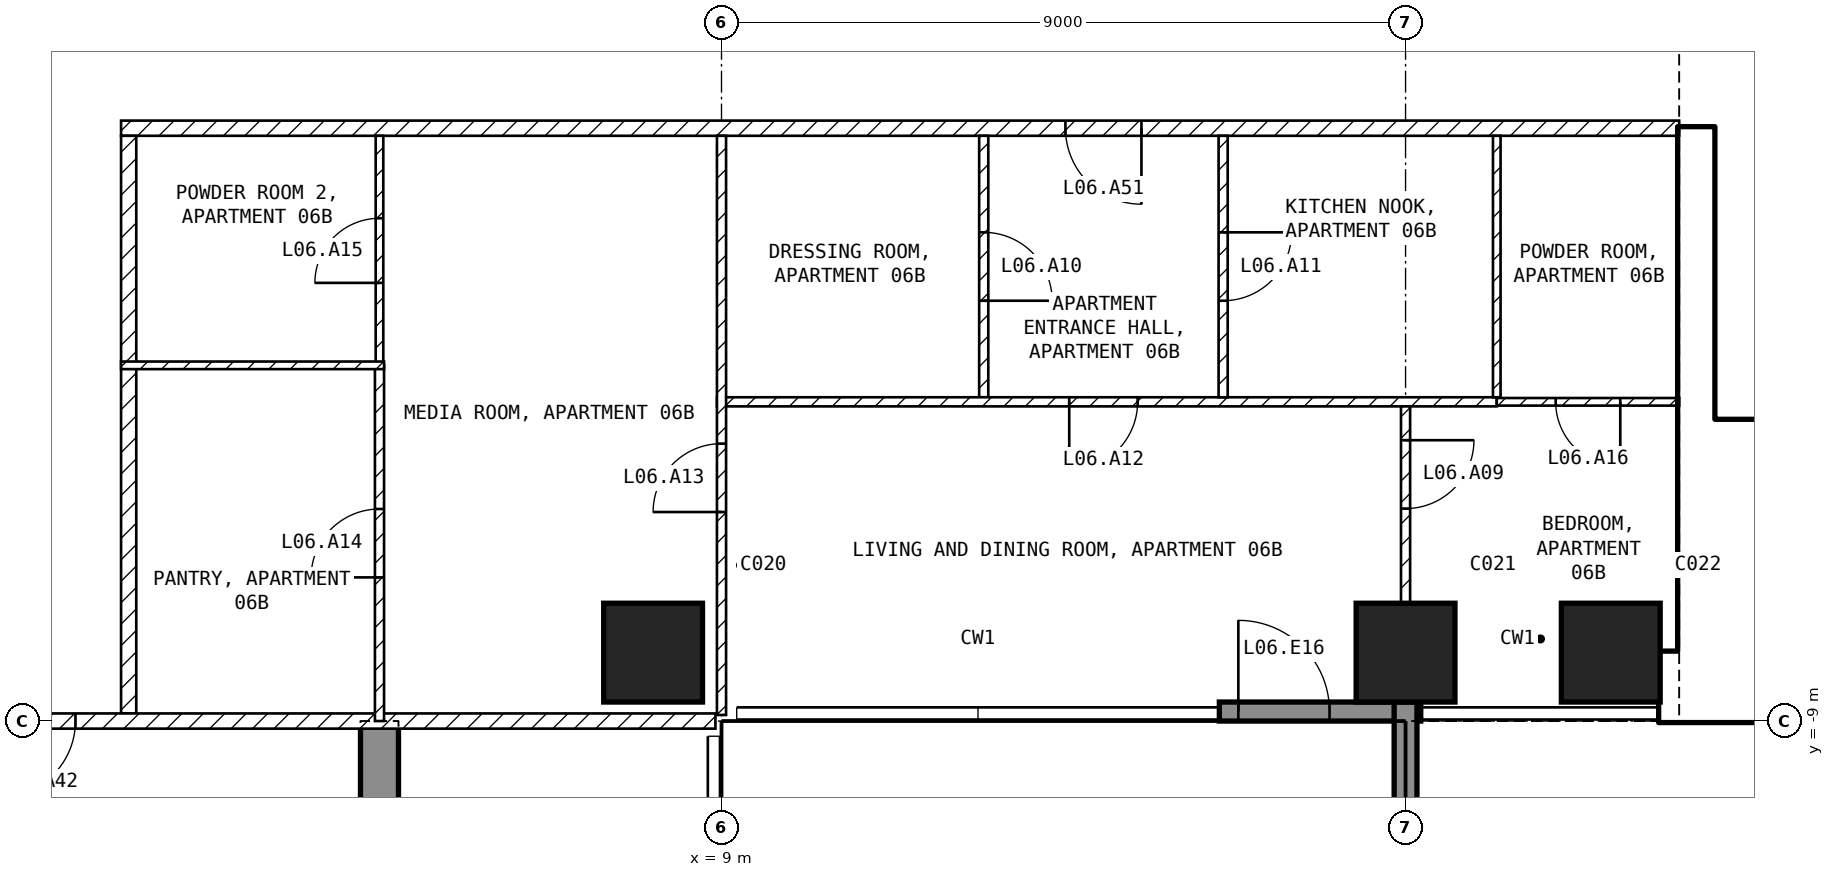
"""IFC4 building model, lengths in metres.
Left out: names, types, materials, properties, quantities, classifications, styles, units other than length and angle.
Written with IfcOpenShell. Run it as: python <this file> out.ifc"""

import sys

from ifc_helpers import new_model, si_unit, direction, frame, frame_2d, origin, origin_2d, place, context, subcontext, project, spatial, polyline, rectangle, outline, extrude, element, fill, save


model = new_model("IFC4")
c1 = context("Model", 3, precision=1e-05, world=origin(), true_north=direction((0.0, 1.0)))
c2 = subcontext(c1, "Body", "Model", "MODEL_VIEW")
j1 = project(units=[si_unit("LENGTHUNIT", "METRE"), si_unit("PLANEANGLEUNIT", "RADIAN")], contexts=[c1])
p1 = place(None, origin())
s1 = spatial("IfcSite", under=j1, at=p1, CompositionType="ELEMENT")
p2 = place(p1, origin())
s2 = spatial("IfcBuilding", under=s1, at=p2, CompositionType="ELEMENT")
p3 = place(p2, frame((0.0, 0.0, 40.0)))
s3 = spatial("IfcBuildingStorey", under=s2, at=p3, CompositionType="ELEMENT", Elevation=40.0)
for number, where, z_axis, x_axis in (
    (1, (8.1, -8.1, -0.25), (0.0, 0.0, 1.0), (1.0, 0.0, 0.0)),
    (2, (18.0, -8.1, -0.25), (0.0, 0.0, 1.0), (1.0, 0.0, 0.0)),
    (3, (20.7, -8.1, -0.25), (0.0, 0.0, 1.0), (1.0, 0.0, 0.0)),
):
    element("IfcColumn", number, at=place(p3, frame(where, z_axis=z_axis, x_axis=x_axis)), inside=s3, PredefinedType="COLUMN", context=c2, shape_type="SweptSolid", body=[
        extrude(rectangle(XDim=1.3, YDim=1.3, at=origin_2d()), origin(), (0.0, 0.0, 1.0), 3.5),
    ])
p4 = place(p3, frame((4.25, -25.45, -0.25), z_axis=(1.0, 0.0, 0.0), x_axis=(0.0, 1.0, 0.0)))
e4 = element("IfcWall", 4, at=p4, inside=s3, PredefinedType="SHEAR", context=c2, shape_type="SweptSolid", body=[
    extrude(outline(polyline([(0.0, 0.0), (4.15, 0.0), (4.15, 2.65), (6.55, 2.65), (6.55, 0.0), (11.95, 0.0), (11.95, 2.65), (14.35, 2.65), (14.35, 0.0), (16.45, 0.0), (16.45, 3.5), (0.0, 3.5), (0.0, 0.0)])), origin(), (0.0, 0.0, 1.0), 0.5),
])
p5 = place(p3, frame((15.55, -8.875, 0.0), z_axis=(0.0, 0.0, 1.0), x_axis=(1.0, 0.0, 0.0)))
e5 = element("IfcWall", 5, at=p5, inside=s3, PredefinedType="SOLIDWALL", context=c2, shape_type="SweptSolid", body=[
    extrude(rectangle(XDim=2.65, YDim=0.25, at=frame_2d((1.325, 0.0))), origin(), (0.0, 0.0, 1.0), 3.25),
])
p6 = place(p5, frame((0.25, 0.0, 0.0)))
e6 = element("IfcOpeningElement", 6, at=p6, cuts=e5, PredefinedType="OPENING", context=c2, shape_type="SweptSolid", body=[
    extrude(rectangle(XDim=1.2, YDim=2.4, at=frame_2d((0.6, 1.2))), frame((0.0, 0.135, 0.0), z_axis=(0.0, -1.0, 0.0), x_axis=(1.0, 0.0, 0.0)), (0.0, 0.0, 1.0), 0.27),
])
p7 = place(p3, frame((18.0, -8.75, 0.0), z_axis=(0.0, 0.0, 1.0), x_axis=(0.0, -1.0, 0.0)))
e7 = element("IfcWall", 7, at=p7, inside=s3, PredefinedType="SOLIDWALL", context=c2, shape_type="SweptSolid", body=[
    extrude(rectangle(XDim=2.95, YDim=0.3, at=frame_2d((1.475, 0.0))), origin(), (0.0, 0.0, 1.0), 3.25),
])
p8 = place(p3, frame((21.35, -8.55, 0.0), z_axis=(0.0, 0.0, 1.0), x_axis=(1.0, 0.0, 0.0)))
e8 = element("IfcWall", 8, at=p8, inside=s3, PredefinedType="SHEAR", context=c2, shape_type="SweptSolid", body=[
    extrude(rectangle(XDim=11.05, YDim=0.9, at=frame_2d((5.525, 0.0))), origin(), (0.0, 0.0, 1.0), 3.25),
])
p9 = place(p3, frame((21.825, -8.1, 0.0), z_axis=(0.0, 0.0, 1.0), x_axis=(0.0, 1.0, 0.0)))
e9 = element("IfcWall", 9, at=p9, inside=s3, PredefinedType="SHEAR", context=c2, shape_type="SweptSolid", body=[
    extrude(rectangle(XDim=6.9, YDim=0.45, at=frame_2d((3.45, 0.0))), origin(), (0.0, 0.0, 1.0), 3.25),
])
p10 = place(p3, frame((22.05, -5.15, 0.0), z_axis=(0.0, 0.0, 1.0), x_axis=(1.0, 0.0, 0.0)))
e10 = element("IfcWall", 10, at=p10, inside=s3, PredefinedType="SOLIDWALL", context=c2, shape_type="SweptSolid", body=[
    extrude(rectangle(XDim=6.3, YDim=0.2, at=frame_2d((3.15, 0.0))), origin(), (0.0, 0.0, 1.0), 3.25),
])
p11 = place(p10, frame((0.2, 0.0, 0.0)))
e11 = element("IfcOpeningElement", 11, at=p11, cuts=e10, PredefinedType="OPENING", context=c2, shape_type="SweptSolid", body=[
    extrude(rectangle(XDim=1.0, YDim=2.1, at=frame_2d((0.5, 1.05))), frame((0.0, 0.11, 0.0), z_axis=(0.0, -1.0, 0.0), x_axis=(1.0, 0.0, 0.0)), (0.0, 0.0, 1.0), 0.22),
])
p12 = place(p3, frame((21.6, -1.2, 0.0), z_axis=(0.0, 0.0, 1.0), x_axis=(-1.0, 0.0, 0.0)))
e12 = element("IfcWall", 12, at=p12, inside=s3, PredefinedType="PARTITIONING", context=c2, shape_type="SweptSolid", body=[
    extrude(rectangle(XDim=20.5, YDim=0.2, at=frame_2d((10.25, 0.0))), origin(), (0.0, 0.0, 1.0), 3.25),
])
p13 = place(p12, frame((7.075, 0.0, 0.0)))
e13 = element("IfcOpeningElement", 13, at=p13, cuts=e12, PredefinedType="OPENING", context=c2, shape_type="SweptSolid", body=[
    extrude(rectangle(XDim=1.0, YDim=2.1, at=frame_2d((0.5, 1.05))), frame((0.0, 0.11, 0.0), z_axis=(0.0, -1.0, 0.0), x_axis=(1.0, 0.0, 0.0)), (0.0, 0.0, 1.0), 0.22),
])
p14 = place(p3, frame((1.2, -1.3, 0.0), z_axis=(0.0, 0.0, 1.0), x_axis=(0.0, -1.0, 0.0)))
e14 = element("IfcWall", 14, at=p14, inside=s3, PredefinedType="PARTITIONING", context=c2, shape_type="SweptSolid", body=[
    extrude(rectangle(XDim=7.6, YDim=0.2, at=frame_2d((3.8, 0.0))), origin(), (0.0, 0.0, 1.0), 3.25),
])
p15 = place(p3, frame((8.92, -9.0, 0.0), z_axis=(0.0, 0.0, 1.0), x_axis=(-1.0, 0.0, 0.0)))
e15 = element("IfcWall", 15, at=p15, inside=s3, PredefinedType="PARTITIONING", context=c2, shape_type="SweptSolid", body=[
    extrude(rectangle(XDim=17.84, YDim=0.2, at=frame_2d((8.92, 0.0))), origin(), (0.0, 0.0, 1.0), 3.25),
])
p16 = place(p15, frame((8.42, 0.0, 0.0)))
e16 = element("IfcOpeningElement", 16, at=p16, cuts=e15, PredefinedType="OPENING", context=c2, shape_type="SweptSolid", body=[
    extrude(rectangle(XDim=1.0, YDim=2.1, at=frame_2d((0.5, 1.05))), frame((0.0, 0.11, 0.0), z_axis=(0.0, -1.0, 0.0), x_axis=(1.0, 0.0, 0.0)), (0.0, 0.0, 1.0), 0.22),
])
p17 = place(p3, frame((12.45, -1.3, 0.0), z_axis=(0.0, 0.0, 1.0), x_axis=(0.0, -1.0, 0.0)))
e17 = element("IfcWall", 17, at=p17, inside=s3, PredefinedType="PARTITIONING", context=c2, shape_type="SweptSolid", body=[
    extrude(rectangle(XDim=3.44, YDim=0.12, at=frame_2d((1.72, 0.0))), origin(), (0.0, 0.0, 1.0), 3.25),
])
p18 = place(p17, frame((1.27, 0.0, 0.0)))
e18 = element("IfcOpeningElement", 18, at=p18, cuts=e17, PredefinedType="OPENING", context=c2, shape_type="SweptSolid", body=[
    extrude(rectangle(XDim=0.9, YDim=2.1, at=frame_2d((0.45, 1.05))), frame((0.0, 0.07, 0.0), z_axis=(0.0, -1.0, 0.0), x_axis=(1.0, 0.0, 0.0)), (0.0, 0.0, 1.0), 0.14),
])
p19 = place(p3, frame((19.2, -4.8, 0.0), z_axis=(0.0, 0.0, 1.0), x_axis=(-1.0, 0.0, 0.0)))
e19 = element("IfcWall", 19, at=p19, inside=s3, PredefinedType="PARTITIONING", context=c2, shape_type="SweptSolid", body=[
    extrude(rectangle(XDim=10.26, YDim=0.12, at=frame_2d((5.13, 0.0))), origin(), (0.0, 0.0, 1.0), 3.25),
])
p20 = place(p19, frame((4.725, 0.0, 0.0)))
e20 = element("IfcOpeningElement", 20, at=p20, cuts=e19, PredefinedType="OPENING", context=c2, shape_type="SweptSolid", body=[
    extrude(rectangle(XDim=0.9, YDim=2.1, at=frame_2d((0.45, 1.05))), frame((0.0, 0.07, 0.0), z_axis=(0.0, -1.0, 0.0), x_axis=(1.0, 0.0, 0.0)), (0.0, 0.0, 1.0), 0.14),
])
p21 = place(p3, frame((9.0, -8.92, 0.0), z_axis=(0.0, 0.0, 1.0), x_axis=(0.0, 1.0, 0.0)))
e21 = element("IfcWall", 21, at=p21, inside=s3, PredefinedType="PARTITIONING", context=c2, shape_type="SweptSolid", body=[
    extrude(rectangle(XDim=7.62, YDim=0.12, at=frame_2d((3.81, 0.0))), origin(), (0.0, 0.0, 1.0), 3.25),
])
p22 = place(p21, frame((2.67, 0.0, 0.0)))
e22 = element("IfcOpeningElement", 22, at=p22, cuts=e21, PredefinedType="OPENING", context=c2, shape_type="SweptSolid", body=[
    extrude(rectangle(XDim=0.9, YDim=2.1, at=frame_2d((0.45, 1.05))), frame((0.0, 0.07, 0.0), z_axis=(0.0, -1.0, 0.0), x_axis=(1.0, 0.0, 0.0)), (0.0, 0.0, 1.0), 0.14),
])
p23 = place(p3, frame((15.6, -1.3, 0.0), z_axis=(0.0, 0.0, 1.0), x_axis=(0.0, -1.0, 0.0)))
e23 = element("IfcWall", 23, at=p23, inside=s3, PredefinedType="PARTITIONING", context=c2, shape_type="SweptSolid", body=[
    extrude(rectangle(XDim=3.44, YDim=0.12, at=frame_2d((1.72, 0.0))), origin(), (0.0, 0.0, 1.0), 3.25),
])
p24 = place(p23, frame((1.27, 0.0, 0.0)))
e24 = element("IfcOpeningElement", 24, at=p24, cuts=e23, PredefinedType="OPENING", context=c2, shape_type="SweptSolid", body=[
    extrude(rectangle(XDim=0.9, YDim=2.1, at=frame_2d((0.45, 1.05))), frame((0.0, 0.07, 0.0), z_axis=(0.0, -1.0, 0.0), x_axis=(1.0, 0.0, 0.0)), (0.0, 0.0, 1.0), 0.14),
])
p25 = place(p3, frame((19.2, -1.3, 0.0), z_axis=(0.0, 0.0, 1.0), x_axis=(0.0, -1.0, 0.0)))
e25 = element("IfcWall", 25, at=p25, inside=s3, PredefinedType="PARTITIONING", context=c2, shape_type="SweptSolid", body=[
    extrude(rectangle(XDim=3.44, YDim=0.1, at=frame_2d((1.72, 0.0))), origin(), (0.0, 0.0, 1.0), 3.25),
])
p26 = place(p3, frame((21.6, -4.8, 0.0), z_axis=(0.0, 0.0, 1.0), x_axis=(-1.0, 0.0, 0.0)))
e26 = element("IfcWall", 26, at=p26, inside=s3, PredefinedType="PARTITIONING", context=c2, shape_type="SweptSolid", body=[
    extrude(rectangle(XDim=2.4, YDim=0.1, at=frame_2d((1.2, 0.0))), origin(), (0.0, 0.0, 1.0), 3.25),
])
p27 = place(p26, frame((0.775, 0.0, 0.0)))
e27 = element("IfcOpeningElement", 27, at=p27, cuts=e26, PredefinedType="OPENING", context=c2, shape_type="SweptSolid", body=[
    extrude(rectangle(XDim=0.85, YDim=2.1, at=frame_2d((0.425, 1.05))), frame((0.0, 0.06, 0.0), z_axis=(0.0, -1.0, 0.0), x_axis=(1.0, 0.0, 0.0)), (0.0, 0.0, 1.0), 0.12),
])
p28 = place(p3, frame((18.0, -4.86, 0.0), z_axis=(0.0, 0.0, 1.0), x_axis=(0.0, -1.0, 0.0)))
e28 = element("IfcWall", 28, at=p28, inside=s3, PredefinedType="PARTITIONING", context=c2, shape_type="SweptSolid", body=[
    extrude(rectangle(XDim=2.59, YDim=0.12, at=frame_2d((1.295, 0.0))), origin(), (0.0, 0.0, 1.0), 2.346),
])
p29 = place(p28, frame((0.445, 0.0, 0.0)))
e29 = element("IfcOpeningElement", 29, at=p29, cuts=e28, PredefinedType="OPENING", context=c2, shape_type="SweptSolid", body=[
    extrude(rectangle(XDim=0.9, YDim=2.1, at=frame_2d((0.45, 1.05))), frame((0.0, 0.07, 0.0), z_axis=(0.0, -1.0, 0.0), x_axis=(1.0, 0.0, 0.0)), (0.0, 0.0, 1.0), 0.14),
])
p30 = place(p3, frame((4.5, -4.32, 0.0), z_axis=(0.0, 0.0, 1.0), x_axis=(0.0, 1.0, 0.0)))
e30 = element("IfcWall", 30, at=p30, inside=s3, PredefinedType="PARTITIONING", context=c2, shape_type="SweptSolid", body=[
    extrude(rectangle(XDim=3.02, YDim=0.1, at=frame_2d((1.51, 0.0))), origin(), (0.0, 0.0, 1.0), 3.25),
])
p31 = place(p30, frame((1.085, 0.0, 0.0)))
e31 = element("IfcOpeningElement", 31, at=p31, cuts=e30, PredefinedType="OPENING", context=c2, shape_type="SweptSolid", body=[
    extrude(rectangle(XDim=0.85, YDim=2.1, at=frame_2d((0.425, 1.05))), frame((0.0, 0.06, 0.0), z_axis=(0.0, -1.0, 0.0), x_axis=(1.0, 0.0, 0.0)), (0.0, 0.0, 1.0), 0.12),
])
p32 = place(p3, frame((4.5, -9.0, 0.0), z_axis=(0.0, 0.0, 1.0), x_axis=(0.0, 1.0, 0.0)))
e32 = element("IfcWall", 32, at=p32, inside=s3, PredefinedType="PARTITIONING", context=c2, shape_type="SweptSolid", body=[
    extrude(rectangle(XDim=4.68, YDim=0.12, at=frame_2d((2.34, 0.0))), origin(), (0.0, 0.0, 1.0), 3.25),
])
p33 = place(p32, frame((1.89, 0.0, 0.0)))
e33 = element("IfcOpeningElement", 33, at=p33, cuts=e32, PredefinedType="OPENING", context=c2, shape_type="SweptSolid", body=[
    extrude(rectangle(XDim=0.9, YDim=2.1, at=frame_2d((0.45, 1.05))), frame((0.0, 0.07, 0.0), z_axis=(0.0, -1.0, 0.0), x_axis=(1.0, 0.0, 0.0)), (0.0, 0.0, 1.0), 0.14),
])
p34 = place(p3, frame((4.56, -4.32, 0.0), z_axis=(0.0, 0.0, 1.0), x_axis=(-1.0, 0.0, 0.0)))
e34 = element("IfcWall", 34, at=p34, inside=s3, PredefinedType="PARTITIONING", context=c2, shape_type="SweptSolid", body=[
    extrude(rectangle(XDim=3.46, YDim=0.1, at=frame_2d((1.73, 0.0))), origin(), (0.0, 0.0, 1.0), 3.25),
])
p35 = place(p6, origin())
e35 = element("IfcDoor", 35, at=p35, inside=s3, OperationType="SINGLE_SWING_LEFT", PredefinedType="DOOR", context=c2, shape_type="SweptSolid", body=[
    extrude(rectangle(XDim=1.2, YDim=2.4, at=frame_2d((0.6, 1.2))), frame((0.0, 0.025, 0.0), z_axis=(0.0, -1.0, 0.0), x_axis=(1.0, 0.0, 0.0)), (0.0, 0.0, 1.0), 0.05),
])
fill(e6, e35)
p36 = place(p11, origin())
e36 = element("IfcDoor", 36, at=p36, inside=s3, OperationType="SINGLE_SWING_LEFT", PredefinedType="DOOR", context=c2, shape_type="SweptSolid", body=[
    extrude(rectangle(XDim=1.0, YDim=2.1, at=frame_2d((0.5, 1.05))), frame((0.0, 0.025, 0.0), z_axis=(0.0, -1.0, 0.0), x_axis=(1.0, 0.0, 0.0)), (0.0, 0.0, 1.0), 0.05),
])
fill(e11, e36)
p37 = place(p29, origin())
e37 = element("IfcDoor", 37, at=p37, inside=s3, OperationType="SINGLE_SWING_LEFT", PredefinedType="DOOR", context=c2, shape_type="SweptSolid", body=[
    extrude(rectangle(XDim=0.9, YDim=2.1, at=frame_2d((0.45, 1.05))), frame((0.0, 0.025, 0.0), z_axis=(0.0, -1.0, 0.0), x_axis=(1.0, 0.0, 0.0)), (0.0, 0.0, 1.0), 0.05),
])
fill(e29, e37)
p38 = place(p18, origin())
e38 = element("IfcDoor", 38, at=p38, inside=s3, OperationType="SINGLE_SWING_RIGHT", PredefinedType="DOOR", context=c2, shape_type="SweptSolid", body=[
    extrude(rectangle(XDim=0.9, YDim=2.1, at=frame_2d((0.45, 1.05))), frame((0.0, 0.025, 0.0), z_axis=(0.0, -1.0, 0.0), x_axis=(1.0, 0.0, 0.0)), (0.0, 0.0, 1.0), 0.05),
])
fill(e18, e38)
p39 = place(p24, origin())
e39 = element("IfcDoor", 39, at=p39, inside=s3, OperationType="SINGLE_SWING_LEFT", PredefinedType="DOOR", context=c2, shape_type="SweptSolid", body=[
    extrude(rectangle(XDim=0.9, YDim=2.1, at=frame_2d((0.45, 1.05))), frame((0.0, 0.025, 0.0), z_axis=(0.0, -1.0, 0.0), x_axis=(1.0, 0.0, 0.0)), (0.0, 0.0, 1.0), 0.05),
])
fill(e24, e39)
p40 = place(p20, origin())
e40 = element("IfcDoor", 40, at=p40, inside=s3, OperationType="SINGLE_SWING_RIGHT", PredefinedType="DOOR", context=c2, shape_type="SweptSolid", body=[
    extrude(rectangle(XDim=0.9, YDim=2.1, at=frame_2d((0.45, 1.05))), frame((0.0, 0.025, 0.0), z_axis=(0.0, -1.0, 0.0), x_axis=(1.0, 0.0, 0.0)), (0.0, 0.0, 1.0), 0.05),
])
fill(e20, e40)
p41 = place(p22, origin())
e41 = element("IfcDoor", 41, at=p41, inside=s3, OperationType="SINGLE_SWING_LEFT", PredefinedType="DOOR", context=c2, shape_type="SweptSolid", body=[
    extrude(rectangle(XDim=0.9, YDim=2.1, at=frame_2d((0.45, 1.05))), frame((0.0, 0.025, 0.0), z_axis=(0.0, -1.0, 0.0), x_axis=(1.0, 0.0, 0.0)), (0.0, 0.0, 1.0), 0.05),
])
fill(e22, e41)
p42 = place(p33, origin())
e42 = element("IfcDoor", 42, at=p42, inside=s3, OperationType="SINGLE_SWING_LEFT", PredefinedType="DOOR", context=c2, shape_type="SweptSolid", body=[
    extrude(rectangle(XDim=0.9, YDim=2.1, at=frame_2d((0.45, 1.05))), frame((0.0, 0.025, 0.0), z_axis=(0.0, -1.0, 0.0), x_axis=(1.0, 0.0, 0.0)), (0.0, 0.0, 1.0), 0.05),
])
fill(e33, e42)
p43 = place(p31, origin())
e43 = element("IfcDoor", 43, at=p43, inside=s3, OperationType="SINGLE_SWING_LEFT", PredefinedType="DOOR", context=c2, shape_type="SweptSolid", body=[
    extrude(rectangle(XDim=0.85, YDim=2.1, at=frame_2d((0.425, 1.05))), frame((0.0, 0.025, 0.0), z_axis=(0.0, -1.0, 0.0), x_axis=(1.0, 0.0, 0.0)), (0.0, 0.0, 1.0), 0.05),
])
fill(e31, e43)
p44 = place(p27, origin())
e44 = element("IfcDoor", 44, at=p44, inside=s3, OperationType="SINGLE_SWING_LEFT", PredefinedType="DOOR", context=c2, shape_type="SweptSolid", body=[
    extrude(rectangle(XDim=0.85, YDim=2.1, at=frame_2d((0.425, 1.05))), frame((0.0, 0.025, 0.0), z_axis=(0.0, -1.0, 0.0), x_axis=(1.0, 0.0, 0.0)), (0.0, 0.0, 1.0), 0.05),
])
fill(e27, e44)
p45 = place(p16, origin())
e45 = element("IfcDoor", 45, at=p45, inside=s3, OperationType="SINGLE_SWING_RIGHT", PredefinedType="DOOR", context=c2, shape_type="SweptSolid", body=[
    extrude(rectangle(XDim=1.0, YDim=2.1, at=frame_2d((0.5, 1.05))), frame((0.0, 0.025, 0.0), z_axis=(0.0, -1.0, 0.0), x_axis=(1.0, 0.0, 0.0)), (0.0, 0.0, 1.0), 0.05),
])
fill(e16, e45)
p46 = place(p13, origin())
e46 = element("IfcDoor", 46, at=p46, inside=s3, OperationType="SINGLE_SWING_LEFT", PredefinedType="DOOR", context=c2, shape_type="SweptSolid", body=[
    extrude(rectangle(XDim=1.0, YDim=2.1, at=frame_2d((0.5, 1.05))), frame((0.0, 0.025, 0.0), z_axis=(0.0, -1.0, 0.0), x_axis=(1.0, 0.0, 0.0)), (0.0, 0.0, 1.0), 0.05),
])
fill(e13, e46)
save(model, sys.argv[1])
